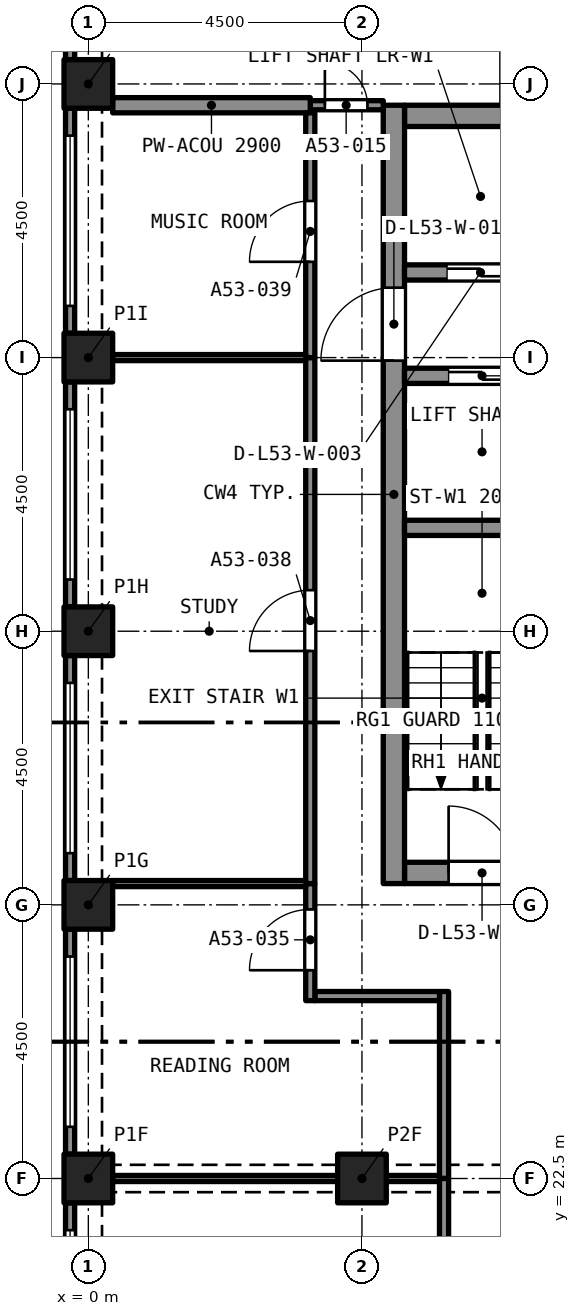
"""IFC4 building model, lengths in metres.
Left out: names, types, materials, properties, quantities, classifications, styles, units other than length and angle.
Written with IfcOpenShell. Run it as: python <this file> out.ifc"""

import sys

from ifc_helpers import new_model, si_unit, direction, frame, frame_2d, origin, origin_2d, place, context, subcontext, project, spatial, rectangle, extrude, element, fill, save


model = new_model("IFC4")
c1 = context("Model", 3, precision=1e-05, world=origin(), true_north=direction((0.0, 1.0)))
c2 = subcontext(c1, "Body", "Model", "MODEL_VIEW")
j1 = project(units=[si_unit("LENGTHUNIT", "METRE"), si_unit("PLANEANGLEUNIT", "RADIAN")], contexts=[c1])
p1 = place(None, origin())
s1 = spatial("IfcSite", under=j1, at=p1, CompositionType="ELEMENT")
p2 = place(p1, origin())
s2 = spatial("IfcBuilding", under=s1, at=p2, CompositionType="ELEMENT")
p3 = place(p2, frame((0.0, 0.0, 192.3)))
s3 = spatial("IfcBuildingStorey", under=s2, at=p3, CompositionType="ELEMENT", Elevation=192.3)
for number, where, z_axis, x_axis in (
    (1, (0.0, 22.5, 0.0), (0.0, 0.0, 1.0), (1.0, 0.0, 0.0)),
    (2, (4.5, 22.5, 0.0), (0.0, 0.0, 1.0), (1.0, 0.0, 0.0)),
    (3, (0.0, 27.0, 0.0), (0.0, 0.0, 1.0), (1.0, 0.0, 0.0)),
    (4, (0.0, 31.5, 0.0), (0.0, 0.0, 1.0), (1.0, 0.0, 0.0)),
    (5, (0.0, 36.0, 0.0), (0.0, 0.0, 1.0), (1.0, 0.0, 0.0)),
    (6, (0.0, 40.5, 0.0), (0.0, 0.0, 1.0), (1.0, 0.0, 0.0)),
):
    element("IfcColumn", number, at=place(p3, frame(where, z_axis=z_axis, x_axis=x_axis)), inside=s3, PredefinedType="COLUMN", context=c2, shape_type="SweptSolid", body=[
        extrude(rectangle(XDim=0.8, YDim=0.8, at=origin_2d()), origin(), (0.0, 0.0, 1.0), 3.2),
    ])
p4 = place(p3, frame((5.2, 27.525, 0.0), z_axis=(0.0, 0.0, 1.0), x_axis=(1.0, 0.0, 0.0)))
e7 = element("IfcWall", 7, at=p4, inside=s3, PredefinedType="SOLIDWALL", context=c2, shape_type="SweptSolid", body=[
    extrude(rectangle(XDim=7.6, YDim=0.35, at=frame_2d((3.8, 0.0))), origin(), (0.0, 0.0, 1.0), 3.2),
])
p5 = place(p4, frame((0.725, 0.0, 0.0)))
e8 = element("IfcOpeningElement", 8, at=p5, cuts=e7, PredefinedType="OPENING", context=c2, shape_type="SweptSolid", body=[
    extrude(rectangle(XDim=1.1, YDim=2.1, at=frame_2d((0.55, 1.05))), frame((0.0, 0.185, 0.0), z_axis=(0.0, -1.0, 0.0), x_axis=(1.0, 0.0, 0.0)), (0.0, 0.0, 1.0), 0.37),
])
p6 = place(p4, frame((3.25, 0.0, 0.0)))
e9 = element("IfcOpeningElement", 9, at=p6, cuts=e7, PredefinedType="OPENING", context=c2, shape_type="SweptSolid", body=[
    extrude(rectangle(XDim=1.1, YDim=2.1, at=frame_2d((0.55, 1.05))), frame((0.0, 0.185, 0.0), z_axis=(0.0, -1.0, 0.0), x_axis=(1.0, 0.0, 0.0)), (0.0, 0.0, 1.0), 0.37),
])
p7 = place(p4, frame((5.775, 0.0, 0.0)))
e10 = element("IfcOpeningElement", 10, at=p7, cuts=e7, PredefinedType="OPENING", context=c2, shape_type="SweptSolid", body=[
    extrude(rectangle(XDim=1.1, YDim=2.1, at=frame_2d((0.55, 1.05))), frame((0.0, 0.185, 0.0), z_axis=(0.0, -1.0, 0.0), x_axis=(1.0, 0.0, 0.0)), (0.0, 0.0, 1.0), 0.37),
])
p8 = place(p3, frame((5.2, 39.975, 0.0), z_axis=(0.0, 0.0, 1.0), x_axis=(1.0, 0.0, 0.0)))
e11 = element("IfcWall", 11, at=p8, inside=s3, PredefinedType="SOLIDWALL", context=c2, shape_type="SweptSolid", body=[
    extrude(rectangle(XDim=7.6, YDim=0.35, at=frame_2d((3.8, 0.0))), origin(), (0.0, 0.0, 1.0), 3.2),
])
p9 = place(p3, frame((5.025, 27.35, 0.0), z_axis=(0.0, 0.0, 1.0), x_axis=(0.0, 1.0, 0.0)))
e12 = element("IfcWall", 12, at=p9, inside=s3, PredefinedType="SOLIDWALL", context=c2, shape_type="SweptSolid", body=[
    extrude(rectangle(XDim=12.8, YDim=0.35, at=frame_2d((6.4, 0.0))), origin(), (0.0, 0.0, 1.0), 3.2),
])
p10 = place(p9, frame((8.6, 0.0, 0.0)))
e13 = element("IfcOpeningElement", 13, at=p10, cuts=e12, PredefinedType="OPENING", context=c2, shape_type="SweptSolid", body=[
    extrude(rectangle(XDim=1.2, YDim=2.1, at=frame_2d((0.6, 1.05))), frame((0.0, 0.185, 0.0), z_axis=(0.0, -1.0, 0.0), x_axis=(1.0, 0.0, 0.0)), (0.0, 0.0, 1.0), 0.37),
])
p11 = place(p3, frame((-0.3, 40.9, 0.0), z_axis=(0.0, 0.0, 1.0), x_axis=(0.0, 1.0, 0.0)))
e14 = element("IfcWall", 14, at=p11, inside=s3, PredefinedType="SOLIDWALL", context=c2, shape_type="SweptSolid", body=[
    extrude(rectangle(XDim=3.7, YDim=0.15, at=frame_2d((1.85, 0.0))), origin(), (0.0, 0.0, 1.0), 3.2),
])
p12 = place(p11, frame((0.45, 0.0, 0.45)))
e15 = element("IfcOpeningElement", 15, at=p12, cuts=e14, PredefinedType="OPENING", context=c2, shape_type="SweptSolid", body=[
    extrude(rectangle(XDim=2.8, YDim=1.95, at=frame_2d((1.4, 0.975))), frame((0.0, 0.085, 0.0), z_axis=(0.0, -1.0, 0.0), x_axis=(1.0, 0.0, 0.0)), (0.0, 0.0, 1.0), 0.17),
])
p13 = place(p3, frame((-0.3, 36.4, 0.0), z_axis=(0.0, 0.0, 1.0), x_axis=(0.0, 1.0, 0.0)))
e16 = element("IfcWall", 16, at=p13, inside=s3, PredefinedType="SOLIDWALL", context=c2, shape_type="SweptSolid", body=[
    extrude(rectangle(XDim=3.7, YDim=0.15, at=frame_2d((1.85, 0.0))), origin(), (0.0, 0.0, 1.0), 3.2),
])
p14 = place(p13, frame((0.45, 0.0, 0.45)))
e17 = element("IfcOpeningElement", 17, at=p14, cuts=e16, PredefinedType="OPENING", context=c2, shape_type="SweptSolid", body=[
    extrude(rectangle(XDim=2.8, YDim=1.95, at=frame_2d((1.4, 0.975))), frame((0.0, 0.085, 0.0), z_axis=(0.0, -1.0, 0.0), x_axis=(1.0, 0.0, 0.0)), (0.0, 0.0, 1.0), 0.17),
])
p15 = place(p3, frame((-0.3, 31.9, 0.0), z_axis=(0.0, 0.0, 1.0), x_axis=(0.0, 1.0, 0.0)))
e18 = element("IfcWall", 18, at=p15, inside=s3, PredefinedType="SOLIDWALL", context=c2, shape_type="SweptSolid", body=[
    extrude(rectangle(XDim=3.7, YDim=0.15, at=frame_2d((1.85, 0.0))), origin(), (0.0, 0.0, 1.0), 3.2),
])
p16 = place(p15, frame((0.45, 0.0, 0.45)))
e19 = element("IfcOpeningElement", 19, at=p16, cuts=e18, PredefinedType="OPENING", context=c2, shape_type="SweptSolid", body=[
    extrude(rectangle(XDim=2.8, YDim=1.95, at=frame_2d((1.4, 0.975))), frame((0.0, 0.085, 0.0), z_axis=(0.0, -1.0, 0.0), x_axis=(1.0, 0.0, 0.0)), (0.0, 0.0, 1.0), 0.17),
])
p17 = place(p3, frame((-0.3, 27.4, 0.0), z_axis=(0.0, 0.0, 1.0), x_axis=(0.0, 1.0, 0.0)))
e20 = element("IfcWall", 20, at=p17, inside=s3, PredefinedType="SOLIDWALL", context=c2, shape_type="SweptSolid", body=[
    extrude(rectangle(XDim=3.7, YDim=0.15, at=frame_2d((1.85, 0.0))), origin(), (0.0, 0.0, 1.0), 3.2),
])
p18 = place(p17, frame((0.45, 0.0, 0.45)))
e21 = element("IfcOpeningElement", 21, at=p18, cuts=e20, PredefinedType="OPENING", context=c2, shape_type="SweptSolid", body=[
    extrude(rectangle(XDim=2.8, YDim=1.95, at=frame_2d((1.4, 0.975))), frame((0.0, 0.085, 0.0), z_axis=(0.0, -1.0, 0.0), x_axis=(1.0, 0.0, 0.0)), (0.0, 0.0, 1.0), 0.17),
])
p19 = place(p3, frame((-0.3, 22.9, 0.0), z_axis=(0.0, 0.0, 1.0), x_axis=(0.0, 1.0, 0.0)))
e22 = element("IfcWall", 22, at=p19, inside=s3, PredefinedType="SOLIDWALL", context=c2, shape_type="SweptSolid", body=[
    extrude(rectangle(XDim=3.7, YDim=0.15, at=frame_2d((1.85, 0.0))), origin(), (0.0, 0.0, 1.0), 3.2),
])
p20 = place(p19, frame((0.45, 0.0, 0.45)))
e23 = element("IfcOpeningElement", 23, at=p20, cuts=e22, PredefinedType="OPENING", context=c2, shape_type="SweptSolid", body=[
    extrude(rectangle(XDim=2.8, YDim=1.95, at=frame_2d((1.4, 0.975))), frame((0.0, 0.085, 0.0), z_axis=(0.0, -1.0, 0.0), x_axis=(1.0, 0.0, 0.0)), (0.0, 0.0, 1.0), 0.17),
])
p21 = place(p3, frame((-0.3, 18.4, 0.0), z_axis=(0.0, 0.0, 1.0), x_axis=(0.0, 1.0, 0.0)))
e24 = element("IfcWall", 24, at=p21, inside=s3, PredefinedType="SOLIDWALL", context=c2, shape_type="SweptSolid", body=[
    extrude(rectangle(XDim=3.7, YDim=0.15, at=frame_2d((1.85, 0.0))), origin(), (0.0, 0.0, 1.0), 3.2),
])
p22 = place(p21, frame((0.45, 0.0, 0.45)))
e25 = element("IfcOpeningElement", 25, at=p22, cuts=e24, PredefinedType="OPENING", context=c2, shape_type="SweptSolid", body=[
    extrude(rectangle(XDim=2.8, YDim=1.95, at=frame_2d((1.4, 0.975))), frame((0.0, 0.085, 0.0), z_axis=(0.0, -1.0, 0.0), x_axis=(1.0, 0.0, 0.0)), (0.0, 0.0, 1.0), 0.17),
])
p23 = place(p3, frame((3.65, 40.15, 0.0), z_axis=(0.0, 0.0, 1.0), x_axis=(1.0, 0.0, 0.0)))
e26 = element("IfcWall", 26, at=p23, inside=s3, PredefinedType="PARTITIONING", context=c2, shape_type="SweptSolid", body=[
    extrude(rectangle(XDim=1.2, YDim=0.15, at=frame_2d((0.6, 0.0))), origin(), (0.0, 0.0, 1.0), 2.9),
])
p24 = place(p23, frame((0.24, 0.0, 0.0)))
e27 = element("IfcOpeningElement", 27, at=p24, cuts=e26, PredefinedType="OPENING", context=c2, shape_type="SweptSolid", body=[
    extrude(rectangle(XDim=0.7, YDim=2.1, at=frame_2d((0.35, 1.05))), frame((0.0, 0.085, 0.0), z_axis=(0.0, -1.0, 0.0), x_axis=(1.0, 0.0, 0.0)), (0.0, 0.0, 1.0), 0.17),
])
p25 = place(p3, frame((0.4, 40.15, 0.0), z_axis=(0.0, 0.0, 1.0), x_axis=(1.0, 0.0, 0.0)))
e28 = element("IfcWall", 28, at=p25, inside=s3, PredefinedType="PARTITIONING", context=c2, shape_type="SweptSolid", body=[
    extrude(rectangle(XDim=3.25, YDim=0.25, at=frame_2d((1.625, 0.0))), origin(), (0.0, 0.0, 1.0), 2.9),
])
p26 = place(p3, frame((5.85, 22.5, 0.0), z_axis=(0.0, 0.0, 1.0), x_axis=(0.0, 1.0, 0.0)))
e29 = element("IfcWall", 29, at=p26, inside=s3, PredefinedType="PARTITIONING", context=c2, shape_type="SweptSolid", body=[
    extrude(rectangle(XDim=3.075, YDim=0.15, at=frame_2d((1.538, 0.0))), origin(), (0.0, 0.0, 1.0), 2.9),
])
p27 = place(p3, frame((3.725, 25.5, 0.0), z_axis=(0.0, 0.0, 1.0), x_axis=(1.0, 0.0, 0.0)))
e30 = element("IfcWall", 30, at=p27, inside=s3, PredefinedType="PARTITIONING", context=c2, shape_type="SweptSolid", body=[
    extrude(rectangle(XDim=2.05, YDim=0.15, at=frame_2d((1.025, 0.0))), origin(), (0.0, 0.0, 1.0), 2.9),
])
p28 = place(p3, frame((3.65, 25.425, 0.0), z_axis=(0.0, 0.0, 1.0), x_axis=(0.0, 1.0, 0.0)))
e31 = element("IfcWall", 31, at=p28, inside=s3, PredefinedType="PARTITIONING", context=c2, shape_type="SweptSolid", body=[
    extrude(rectangle(XDim=1.925, YDim=0.15, at=frame_2d((0.962, 0.0))), origin(), (0.0, 0.0, 1.0), 2.9),
])
p29 = place(p28, frame((0.5, 0.0, 0.0)))
e32 = element("IfcOpeningElement", 32, at=p29, cuts=e31, PredefinedType="OPENING", context=c2, shape_type="SweptSolid", body=[
    extrude(rectangle(XDim=1.0, YDim=2.1, at=frame_2d((0.5, 1.05))), frame((0.0, 0.085, 0.0), z_axis=(0.0, -1.0, 0.0), x_axis=(1.0, 0.0, 0.0)), (0.0, 0.0, 1.0), 0.17),
])
p30 = place(p3, frame((3.65, 27.35, 0.0), z_axis=(0.0, 0.0, 1.0), x_axis=(0.0, 1.0, 0.0)))
e33 = element("IfcWall", 33, at=p30, inside=s3, PredefinedType="PARTITIONING", context=c2, shape_type="SweptSolid", body=[
    extrude(rectangle(XDim=8.65, YDim=0.15, at=frame_2d((4.325, 0.0))), origin(), (0.0, 0.0, 1.0), 2.9),
])
p31 = place(p30, frame((3.825, 0.0, 0.0)))
e34 = element("IfcOpeningElement", 34, at=p31, cuts=e33, PredefinedType="OPENING", context=c2, shape_type="SweptSolid", body=[
    extrude(rectangle(XDim=1.0, YDim=2.1, at=frame_2d((0.5, 1.05))), frame((0.0, 0.085, 0.0), z_axis=(0.0, -1.0, 0.0), x_axis=(1.0, 0.0, 0.0)), (0.0, 0.0, 1.0), 0.17),
])
p32 = place(p3, frame((3.65, 36.0, 0.0), z_axis=(0.0, 0.0, 1.0), x_axis=(0.0, 1.0, 0.0)))
e35 = element("IfcWall", 35, at=p32, inside=s3, PredefinedType="PARTITIONING", context=c2, shape_type="SweptSolid", body=[
    extrude(rectangle(XDim=4.025, YDim=0.15, at=frame_2d((2.012, 0.0))), origin(), (0.0, 0.0, 1.0), 2.9),
])
p33 = place(p32, frame((1.575, 0.0, 0.0)))
e36 = element("IfcOpeningElement", 36, at=p33, cuts=e35, PredefinedType="OPENING", context=c2, shape_type="SweptSolid", body=[
    extrude(rectangle(XDim=1.0, YDim=2.1, at=frame_2d((0.5, 1.05))), frame((0.0, 0.085, 0.0), z_axis=(0.0, -1.0, 0.0), x_axis=(1.0, 0.0, 0.0)), (0.0, 0.0, 1.0), 0.17),
])
p34 = place(p3, frame((5.85, 13.025, 0.0), z_axis=(0.0, 0.0, 1.0), x_axis=(0.0, 1.0, 0.0)))
e37 = element("IfcWall", 37, at=p34, inside=s3, PredefinedType="PARTITIONING", context=c2, shape_type="SweptSolid", body=[
    extrude(rectangle(XDim=9.475, YDim=0.15, at=frame_2d((4.738, 0.0))), origin(), (0.0, 0.0, 1.0), 2.9),
])
p35 = place(p34, frame((4.275, 0.0, 0.0)))
e38 = element("IfcOpeningElement", 38, at=p35, cuts=e37, PredefinedType="OPENING", context=c2, shape_type="SweptSolid", body=[
    extrude(rectangle(XDim=1.0, YDim=2.1, at=frame_2d((0.5, 1.05))), frame((0.0, 0.085, 0.0), z_axis=(0.0, -1.0, 0.0), x_axis=(1.0, 0.0, 0.0)), (0.0, 0.0, 1.0), 0.17),
])
p36 = place(p3, frame((0.4, 27.35, 0.0), z_axis=(0.0, 0.0, 1.0), x_axis=(1.0, 0.0, 0.0)))
e39 = element("IfcWall", 39, at=p36, inside=s3, PredefinedType="PARTITIONING", context=c2, shape_type="SweptSolid", body=[
    extrude(rectangle(XDim=3.175, YDim=0.1, at=frame_2d((1.587, 0.0))), origin(), (0.0, 0.0, 1.0), 2.9),
])
p37 = place(p3, frame((4.9, 22.5, 0.0), z_axis=(0.0, 0.0, 1.0), x_axis=(1.0, 0.0, 0.0)))
e40 = element("IfcWall", 40, at=p37, inside=s3, PredefinedType="PARTITIONING", context=c2, shape_type="SweptSolid", body=[
    extrude(rectangle(XDim=0.875, YDim=0.1, at=frame_2d((0.438, 0.0))), origin(), (0.0, 0.0, 1.0), 2.38),
])
p38 = place(p3, frame((0.4, 22.5, 0.0), z_axis=(0.0, 0.0, 1.0), x_axis=(1.0, 0.0, 0.0)))
e41 = element("IfcWall", 41, at=p38, inside=s3, PredefinedType="PARTITIONING", context=c2, shape_type="SweptSolid", body=[
    extrude(rectangle(XDim=3.7, YDim=0.1, at=frame_2d((1.85, 0.0))), origin(), (0.0, 0.0, 1.0), 2.38),
])
p39 = place(p3, frame((0.4, 36.0, 0.0), z_axis=(0.0, 0.0, 1.0), x_axis=(1.0, 0.0, 0.0)))
e42 = element("IfcWall", 42, at=p39, inside=s3, PredefinedType="PARTITIONING", context=c2, shape_type="SweptSolid", body=[
    extrude(rectangle(XDim=3.175, YDim=0.1, at=frame_2d((1.587, 0.0))), origin(), (0.0, 0.0, 1.0), 2.9),
])
p40 = place(p3, frame((5.2, 33.2, 0.0), z_axis=(0.0, 0.0, 1.0), x_axis=(1.0, 0.0, 0.0)))
e43 = element("IfcWall", 43, at=p40, inside=s3, PredefinedType="SOLIDWALL", context=c2, shape_type="SweptSolid", body=[
    extrude(rectangle(XDim=7.6, YDim=0.25, at=frame_2d((3.8, 0.0))), origin(), (0.0, 0.0, 1.0), 2.9),
])
p41 = place(p40, frame((3.3, 0.0, 0.0)))
e44 = element("IfcOpeningElement", 44, at=p41, cuts=e43, PredefinedType="OPENING", context=c2, shape_type="SweptSolid", body=[
    extrude(rectangle(XDim=1.0, YDim=2.1, at=frame_2d((0.5, 1.05))), frame((0.0, 0.135, 0.0), z_axis=(0.0, -1.0, 0.0), x_axis=(1.0, 0.0, 0.0)), (0.0, 0.0, 1.0), 0.27),
])
p42 = place(p3, frame((5.2, 35.7, 0.0), z_axis=(0.0, 0.0, 1.0), x_axis=(1.0, 0.0, 0.0)))
e45 = element("IfcWall", 45, at=p42, inside=s3, PredefinedType="SOLIDWALL", context=c2, shape_type="SweptSolid", body=[
    extrude(rectangle(XDim=7.6, YDim=0.25, at=frame_2d((3.8, 0.0))), origin(), (0.0, 0.0, 1.0), 2.9),
])
p43 = place(p42, frame((0.725, 0.0, 0.0)))
e46 = element("IfcOpeningElement", 46, at=p43, cuts=e45, PredefinedType="OPENING", context=c2, shape_type="SweptSolid", body=[
    extrude(rectangle(XDim=1.1, YDim=2.4, at=frame_2d((0.55, 1.2))), frame((0.0, 0.135, 0.0), z_axis=(0.0, -1.0, 0.0), x_axis=(1.0, 0.0, 0.0)), (0.0, 0.0, 1.0), 0.27),
])
p44 = place(p42, frame((5.125, 0.0, 0.0)))
e47 = element("IfcOpeningElement", 47, at=p44, cuts=e45, PredefinedType="OPENING", context=c2, shape_type="SweptSolid", body=[
    extrude(rectangle(XDim=0.8, YDim=2.1, at=frame_2d((0.4, 1.05))), frame((0.0, 0.135, 0.0), z_axis=(0.0, -1.0, 0.0), x_axis=(1.0, 0.0, 0.0)), (0.0, 0.0, 1.0), 0.27),
])
p45 = place(p42, frame((6.45, 0.0, 0.0)))
e48 = element("IfcOpeningElement", 48, at=p45, cuts=e45, PredefinedType="OPENING", context=c2, shape_type="SweptSolid", body=[
    extrude(rectangle(XDim=0.9, YDim=2.1, at=frame_2d((0.45, 1.05))), frame((0.0, 0.135, 0.0), z_axis=(0.0, -1.0, 0.0), x_axis=(1.0, 0.0, 0.0)), (0.0, 0.0, 1.0), 0.27),
])
p46 = place(p3, frame((5.2, 37.4, 0.0), z_axis=(0.0, 0.0, 1.0), x_axis=(1.0, 0.0, 0.0)))
e49 = element("IfcWall", 49, at=p46, inside=s3, PredefinedType="SOLIDWALL", context=c2, shape_type="SweptSolid", body=[
    extrude(rectangle(XDim=7.6, YDim=0.25, at=frame_2d((3.8, 0.0))), origin(), (0.0, 0.0, 1.0), 2.9),
])
p47 = place(p46, frame((0.7, 0.0, 0.0)))
e50 = element("IfcOpeningElement", 50, at=p47, cuts=e49, PredefinedType="OPENING", context=c2, shape_type="SweptSolid", body=[
    extrude(rectangle(XDim=1.1, YDim=2.4, at=frame_2d((0.55, 1.2))), frame((0.0, 0.135, 0.0), z_axis=(0.0, -1.0, 0.0), x_axis=(1.0, 0.0, 0.0)), (0.0, 0.0, 1.0), 0.27),
])
p48 = place(p14, origin())
e51 = element("IfcWindow", 51, at=p48, inside=s3, PartitioningType="SINGLE_PANEL", PredefinedType="WINDOW", context=c2, shape_type="SweptSolid", body=[
    extrude(rectangle(XDim=2.8, YDim=1.95, at=frame_2d((1.4, 0.975))), frame((0.0, 0.03, 0.0), z_axis=(0.0, -1.0, 0.0), x_axis=(1.0, 0.0, 0.0)), (0.0, 0.0, 1.0), 0.06),
])
fill(e17, e51)
p49 = place(p16, origin())
e52 = element("IfcWindow", 52, at=p49, inside=s3, PartitioningType="SINGLE_PANEL", PredefinedType="WINDOW", context=c2, shape_type="SweptSolid", body=[
    extrude(rectangle(XDim=2.8, YDim=1.95, at=frame_2d((1.4, 0.975))), frame((0.0, 0.03, 0.0), z_axis=(0.0, -1.0, 0.0), x_axis=(1.0, 0.0, 0.0)), (0.0, 0.0, 1.0), 0.06),
])
fill(e19, e52)
p50 = place(p18, origin())
e53 = element("IfcWindow", 53, at=p50, inside=s3, PartitioningType="SINGLE_PANEL", PredefinedType="WINDOW", context=c2, shape_type="SweptSolid", body=[
    extrude(rectangle(XDim=2.8, YDim=1.95, at=frame_2d((1.4, 0.975))), frame((0.0, 0.03, 0.0), z_axis=(0.0, -1.0, 0.0), x_axis=(1.0, 0.0, 0.0)), (0.0, 0.0, 1.0), 0.06),
])
fill(e21, e53)
p51 = place(p20, origin())
e54 = element("IfcWindow", 54, at=p51, inside=s3, PartitioningType="SINGLE_PANEL", PredefinedType="WINDOW", context=c2, shape_type="SweptSolid", body=[
    extrude(rectangle(XDim=2.8, YDim=1.95, at=frame_2d((1.4, 0.975))), frame((0.0, 0.03, 0.0), z_axis=(0.0, -1.0, 0.0), x_axis=(1.0, 0.0, 0.0)), (0.0, 0.0, 1.0), 0.06),
])
fill(e23, e54)
p52 = place(p22, origin())
e55 = element("IfcWindow", 55, at=p52, inside=s3, PartitioningType="SINGLE_PANEL", PredefinedType="WINDOW", context=c2, shape_type="SweptSolid", body=[
    extrude(rectangle(XDim=2.8, YDim=1.95, at=frame_2d((1.4, 0.975))), frame((0.0, 0.03, 0.0), z_axis=(0.0, -1.0, 0.0), x_axis=(1.0, 0.0, 0.0)), (0.0, 0.0, 1.0), 0.06),
])
fill(e25, e55)
p53 = place(p24, origin())
e56 = element("IfcDoor", 56, at=p53, inside=s3, OperationType="SINGLE_SWING_LEFT", PredefinedType="DOOR", context=c2, shape_type="SweptSolid", body=[
    extrude(rectangle(XDim=0.7, YDim=2.1, at=frame_2d((0.35, 1.05))), frame((0.0, 0.025, 0.0), z_axis=(0.0, -1.0, 0.0), x_axis=(1.0, 0.0, 0.0)), (0.0, 0.0, 1.0), 0.05),
])
fill(e27, e56)
p54 = place(p29, origin())
e57 = element("IfcDoor", 57, at=p54, inside=s3, OperationType="SINGLE_SWING_RIGHT", PredefinedType="DOOR", context=c2, shape_type="SweptSolid", body=[
    extrude(rectangle(XDim=1.0, YDim=2.1, at=frame_2d((0.5, 1.05))), frame((0.0, 0.025, 0.0), z_axis=(0.0, -1.0, 0.0), x_axis=(1.0, 0.0, 0.0)), (0.0, 0.0, 1.0), 0.05),
])
fill(e32, e57)
p55 = place(p31, origin())
e58 = element("IfcDoor", 58, at=p55, inside=s3, OperationType="SINGLE_SWING_RIGHT", PredefinedType="DOOR", context=c2, shape_type="SweptSolid", body=[
    extrude(rectangle(XDim=1.0, YDim=2.1, at=frame_2d((0.5, 1.05))), frame((0.0, 0.025, 0.0), z_axis=(0.0, -1.0, 0.0), x_axis=(1.0, 0.0, 0.0)), (0.0, 0.0, 1.0), 0.05),
])
fill(e34, e58)
p56 = place(p33, origin())
e59 = element("IfcDoor", 59, at=p56, inside=s3, OperationType="SINGLE_SWING_RIGHT", PredefinedType="DOOR", context=c2, shape_type="SweptSolid", body=[
    extrude(rectangle(XDim=1.0, YDim=2.1, at=frame_2d((0.5, 1.05))), frame((0.0, 0.025, 0.0), z_axis=(0.0, -1.0, 0.0), x_axis=(1.0, 0.0, 0.0)), (0.0, 0.0, 1.0), 0.05),
])
fill(e36, e59)
p57 = place(p47, origin())
e60 = element("IfcDoor", 60, at=p57, inside=s3, OperationType="SLIDING_TO_LEFT", PredefinedType="DOOR", context=c2, shape_type="SweptSolid", body=[
    extrude(rectangle(XDim=1.1, YDim=2.4, at=frame_2d((0.55, 1.2))), frame((0.0, 0.025, 0.0), z_axis=(0.0, -1.0, 0.0), x_axis=(1.0, 0.0, 0.0)), (0.0, 0.0, 1.0), 0.05),
])
fill(e50, e60)
p58 = place(p43, origin())
e61 = element("IfcDoor", 61, at=p58, inside=s3, OperationType="SLIDING_TO_LEFT", PredefinedType="DOOR", context=c2, shape_type="SweptSolid", body=[
    extrude(rectangle(XDim=1.1, YDim=2.4, at=frame_2d((0.55, 1.2))), frame((0.0, 0.025, 0.0), z_axis=(0.0, -1.0, 0.0), x_axis=(1.0, 0.0, 0.0)), (0.0, 0.0, 1.0), 0.05),
])
fill(e46, e61)
p59 = place(p5, origin())
e62 = element("IfcDoor", 62, at=p59, inside=s3, OperationType="SINGLE_SWING_LEFT", PredefinedType="DOOR", context=c2, shape_type="SweptSolid", body=[
    extrude(rectangle(XDim=1.1, YDim=2.1, at=frame_2d((0.55, 1.05))), frame((0.0, 0.025, 0.0), z_axis=(0.0, -1.0, 0.0), x_axis=(1.0, 0.0, 0.0)), (0.0, 0.0, 1.0), 0.05),
])
fill(e8, e62)
p60 = place(p10, origin())
e63 = element("IfcDoor", 63, at=p60, inside=s3, OperationType="SINGLE_SWING_LEFT", PredefinedType="DOOR", context=c2, shape_type="SweptSolid", body=[
    extrude(rectangle(XDim=1.2, YDim=2.1, at=frame_2d((0.6, 1.05))), frame((0.0, 0.025, 0.0), z_axis=(0.0, -1.0, 0.0), x_axis=(1.0, 0.0, 0.0)), (0.0, 0.0, 1.0), 0.05),
])
fill(e13, e63)
save(model, sys.argv[1])
